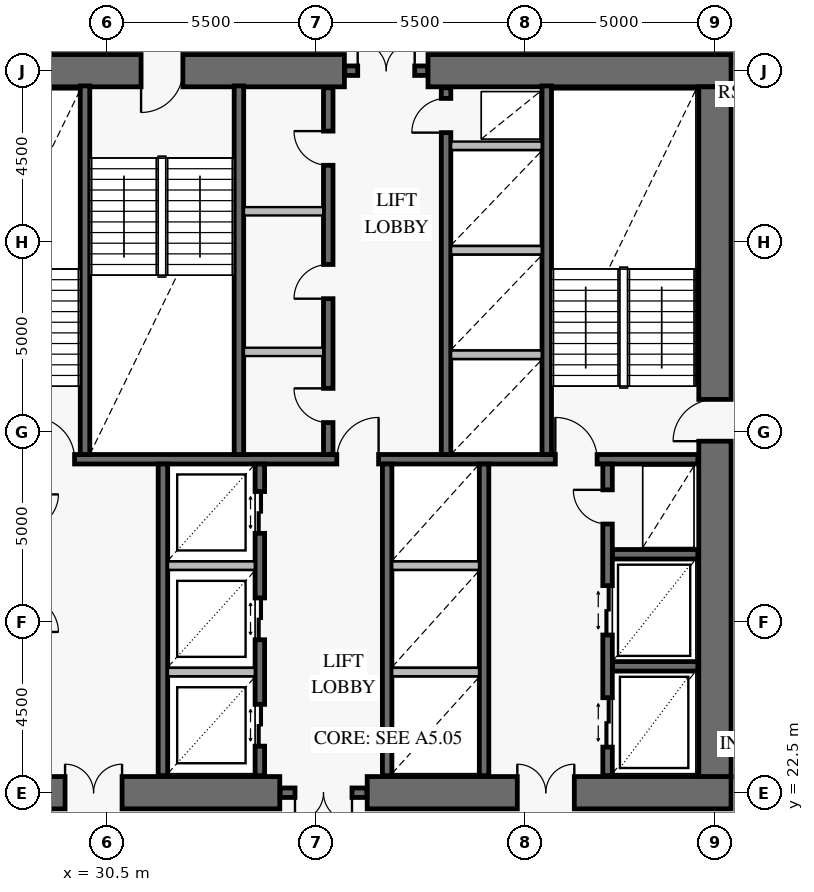
"""IFC4 building model, lengths in metres.
Left out: names, types, materials, properties, quantities, classifications, styles, units other than length and angle.
Written with IfcOpenShell. Run it as: python <this file> out.ifc"""

import sys

from ifc_helpers import new_model, si_unit, direction, frame, frame_2d, origin, place, context, subcontext, project, spatial, rectangle, extrude, element, fill, save


model = new_model("IFC4")
c1 = context("Model", 3, precision=1e-05, world=origin(), true_north=direction((0.0, 1.0)))
c2 = subcontext(c1, "Body", "Model", "MODEL_VIEW")
j1 = project(units=[si_unit("LENGTHUNIT", "METRE"), si_unit("PLANEANGLEUNIT", "RADIAN")], contexts=[c1])
p1 = place(None, origin())
s1 = spatial("IfcSite", under=j1, at=p1, CompositionType="ELEMENT")
p2 = place(p1, origin())
s2 = spatial("IfcBuilding", under=s1, at=p2, CompositionType="ELEMENT")
p3 = place(p2, frame((0.0, 0.0, 20.4)))
s3 = spatial("IfcBuildingStorey", under=s2, at=p3, CompositionType="ELEMENT", Elevation=20.4)
p4 = place(p3, frame((25.075, 22.5, 0.0), z_axis=(0.0, 0.0, 1.0), x_axis=(1.0, 0.0, 0.0)))
e1 = element("IfcWall", 1, at=p4, inside=s3, PredefinedType="SHEAR", context=c2, shape_type="SweptSolid", body=[
    extrude(rectangle(XDim=9.975, YDim=0.85, at=frame_2d((4.988, 0.0))), origin(), (0.0, 0.0, 1.0), 4.2),
])
p5 = place(p4, frame((4.325, 0.0, 0.0)))
e2 = element("IfcOpeningElement", 2, at=p5, cuts=e1, PredefinedType="OPENING", context=c2, shape_type="SweptSolid", body=[
    extrude(rectangle(XDim=1.5, YDim=2.15, at=frame_2d((0.75, 1.075))), frame((0.0, 0.437, 0.0), z_axis=(0.0, -1.0, 0.0), x_axis=(1.0, 0.0, 0.0)), (0.0, 0.0, 1.0), 0.874),
])
p6 = place(p3, frame((37.35, 22.5, 0.0), z_axis=(0.0, 0.0, 1.0), x_axis=(1.0, 0.0, 0.0)))
e3 = element("IfcWall", 3, at=p6, inside=s3, PredefinedType="SHEAR", context=c2, shape_type="SweptSolid", body=[
    extrude(rectangle(XDim=9.575, YDim=0.85, at=frame_2d((4.788, 0.0))), origin(), (0.0, 0.0, 1.0), 4.2),
])
p7 = place(p6, frame((3.95, 0.0, 0.0)))
e4 = element("IfcOpeningElement", 4, at=p7, cuts=e3, PredefinedType="OPENING", context=c2, shape_type="SweptSolid", body=[
    extrude(rectangle(XDim=1.5, YDim=2.15, at=frame_2d((0.75, 1.075))), frame((0.0, 0.437, 0.0), z_axis=(0.0, -1.0, 0.0), x_axis=(1.0, 0.0, 0.0)), (0.0, 0.0, 1.0), 0.874),
])
p8 = place(p3, frame((46.925, 41.5, 0.0), z_axis=(0.0, 0.0, 1.0), x_axis=(-1.0, 0.0, 0.0)))
e5 = element("IfcWall", 5, at=p8, inside=s3, PredefinedType="SHEAR", context=c2, shape_type="SweptSolid", body=[
    extrude(rectangle(XDim=7.975, YDim=0.85, at=frame_2d((3.988, 0.0))), origin(), (0.0, 0.0, 1.0), 4.2),
])
p9 = place(p3, frame((36.75, 41.5, 0.0), z_axis=(0.0, 0.0, 1.0), x_axis=(-1.0, 0.0, 0.0)))
e6 = element("IfcWall", 6, at=p9, inside=s3, PredefinedType="SHEAR", context=c2, shape_type="SweptSolid", body=[
    extrude(rectangle(XDim=11.675, YDim=0.85, at=frame_2d((5.837, 0.0))), origin(), (0.0, 0.0, 1.0), 4.2),
])
p10 = place(p9, frame((4.25, 0.0, 0.0)))
e7 = element("IfcOpeningElement", 7, at=p10, cuts=e6, PredefinedType="OPENING", context=c2, shape_type="SweptSolid", body=[
    extrude(rectangle(XDim=1.1, YDim=2.15, at=frame_2d((0.55, 1.075))), frame((0.0, 0.437, 0.0), z_axis=(0.0, -1.0, 0.0), x_axis=(1.0, 0.0, 0.0)), (0.0, 0.0, 1.0), 0.874),
])
p11 = place(p3, frame((46.5, 22.925, 0.0), z_axis=(0.0, 0.0, 1.0), x_axis=(0.0, 1.0, 0.0)))
e8 = element("IfcWall", 8, at=p11, inside=s3, PredefinedType="SHEAR", context=c2, shape_type="SweptSolid", body=[
    extrude(rectangle(XDim=18.15, YDim=0.85, at=frame_2d((9.075, 0.0))), origin(), (0.0, 0.0, 1.0), 4.2),
])
p12 = place(p11, frame((8.825, 0.0, 0.0)))
e9 = element("IfcOpeningElement", 9, at=p12, cuts=e8, PredefinedType="OPENING", context=c2, shape_type="SweptSolid", body=[
    extrude(rectangle(XDim=1.1, YDim=2.15, at=frame_2d((0.55, 1.075))), frame((0.0, 0.437, 0.0), z_axis=(0.0, -1.0, 0.0), x_axis=(1.0, 0.0, 0.0)), (0.0, 0.0, 1.0), 0.874),
])
p13 = place(p3, frame((35.06, 22.5, 0.0), z_axis=(0.0, 0.0, 1.0), x_axis=(1.0, 0.0, 0.0)))
e10 = element("IfcWall", 10, at=p13, inside=s3, PredefinedType="SOLIDWALL", context=c2, shape_type="SweptSolid", body=[
    extrude(rectangle(XDim=2.28, YDim=0.25, at=frame_2d((1.14, 0.0))), origin(), (0.0, 0.0, 1.0), 4.2),
])
p14 = place(p13, frame((0.39, 0.0, 0.0)))
e11 = element("IfcOpeningElement", 11, at=p14, cuts=e10, PredefinedType="OPENING", context=c2, shape_type="SweptSolid", body=[
    extrude(rectangle(XDim=1.5, YDim=2.15, at=frame_2d((0.75, 1.075))), frame((0.0, 0.137, 0.0), z_axis=(0.0, -1.0, 0.0), x_axis=(1.0, 0.0, 0.0)), (0.0, 0.0, 1.0), 0.274),
])
p15 = place(p3, frame((36.76, 41.5, 0.0), z_axis=(0.0, 0.0, 1.0), x_axis=(1.0, 0.0, 0.0)))
e12 = element("IfcWall", 12, at=p15, inside=s3, PredefinedType="SOLIDWALL", context=c2, shape_type="SweptSolid", body=[
    extrude(rectangle(XDim=2.18, YDim=0.25, at=frame_2d((1.09, 0.0))), origin(), (0.0, 0.0, 1.0), 4.2),
])
p16 = place(p15, frame((0.34, 0.0, 0.0)))
e13 = element("IfcOpeningElement", 13, at=p16, cuts=e12, PredefinedType="OPENING", context=c2, shape_type="SweptSolid", body=[
    extrude(rectangle(XDim=1.5, YDim=2.15, at=frame_2d((0.75, 1.075))), frame((0.0, 0.137, 0.0), z_axis=(0.0, -1.0, 0.0), x_axis=(1.0, 0.0, 0.0)), (0.0, 0.0, 1.0), 0.274),
])
p17 = place(p3, frame((25.95, 31.275, 0.0), z_axis=(0.0, 0.0, 1.0), x_axis=(1.0, 0.0, 0.0)))
e14 = element("IfcWall", 14, at=p17, inside=s3, PredefinedType="SOLIDWALL", context=c2, shape_type="SweptSolid", body=[
    extrude(rectangle(XDim=20.1, YDim=0.25, at=frame_2d((10.05, 0.0))), origin(), (0.0, 0.0, 1.0), 4.2),
])
p18 = place(p17, frame((2.6, 0.0, 0.0)))
e15 = element("IfcOpeningElement", 15, at=p18, cuts=e14, PredefinedType="OPENING", context=c2, shape_type="SweptSolid", body=[
    extrude(rectangle(XDim=1.1, YDim=2.15, at=frame_2d((0.55, 1.075))), frame((0.0, 0.137, 0.0), z_axis=(0.0, -1.0, 0.0), x_axis=(1.0, 0.0, 0.0)), (0.0, 0.0, 1.0), 0.274),
])
p19 = place(p17, frame((10.6, 0.0, 0.0)))
e16 = element("IfcOpeningElement", 16, at=p19, cuts=e14, PredefinedType="OPENING", context=c2, shape_type="SweptSolid", body=[
    extrude(rectangle(XDim=1.1, YDim=2.15, at=frame_2d((0.55, 1.075))), frame((0.0, 0.137, 0.0), z_axis=(0.0, -1.0, 0.0), x_axis=(1.0, 0.0, 0.0)), (0.0, 0.0, 1.0), 0.274),
])
p20 = place(p17, frame((16.35, 0.0, 0.0)))
e17 = element("IfcOpeningElement", 17, at=p20, cuts=e14, PredefinedType="OPENING", context=c2, shape_type="SweptSolid", body=[
    extrude(rectangle(XDim=1.1, YDim=2.15, at=frame_2d((0.55, 1.075))), frame((0.0, 0.137, 0.0), z_axis=(0.0, -1.0, 0.0), x_axis=(1.0, 0.0, 0.0)), (0.0, 0.0, 1.0), 0.274),
])
for number, where, z_axis, x_axis in (
    (18, (29.925, 31.4, 0.0), (0.0, 0.0, 1.0), (0.0, 1.0, 0.0)),
    (19, (33.975, 31.4, 0.0), (0.0, 0.0, 1.0), (0.0, 1.0, 0.0)),
    (20, (42.075, 31.4, 0.0), (0.0, 0.0, 1.0), (0.0, 1.0, 0.0)),
):
    element("IfcWall", number, at=place(p3, frame(where, z_axis=z_axis, x_axis=x_axis)), inside=s3, PredefinedType="SOLIDWALL", context=c2, shape_type="SweptSolid", body=[
        extrude(rectangle(XDim=9.7, YDim=0.25, at=frame_2d((4.85, 0.0))), origin(), (0.0, 0.0, 1.0), 4.2),
    ])
p21 = place(p3, frame((36.325, 31.4, 0.0), z_axis=(0.0, 0.0, 1.0), x_axis=(0.0, 1.0, 0.0)))
e21 = element("IfcWall", 21, at=p21, inside=s3, PredefinedType="SOLIDWALL", context=c2, shape_type="SweptSolid", body=[
    extrude(rectangle(XDim=9.65, YDim=0.25, at=frame_2d((4.825, 0.0))), origin(), (0.0, 0.0, 1.0), 4.2),
])
p22 = place(p21, frame((0.84, 0.0, 0.0)))
e22 = element("IfcOpeningElement", 22, at=p22, cuts=e21, PredefinedType="OPENING", context=c2, shape_type="SweptSolid", body=[
    extrude(rectangle(XDim=0.9, YDim=2.1, at=frame_2d((0.45, 1.05))), frame((0.0, 0.137, 0.0), z_axis=(0.0, -1.0, 0.0), x_axis=(1.0, 0.0, 0.0)), (0.0, 0.0, 1.0), 0.274),
])
p23 = place(p21, frame((4.1, 0.0, 0.0)))
e23 = element("IfcOpeningElement", 23, at=p23, cuts=e21, PredefinedType="OPENING", context=c2, shape_type="SweptSolid", body=[
    extrude(rectangle(XDim=0.9, YDim=2.1, at=frame_2d((0.45, 1.05))), frame((0.0, 0.137, 0.0), z_axis=(0.0, -1.0, 0.0), x_axis=(1.0, 0.0, 0.0)), (0.0, 0.0, 1.0), 0.274),
])
p24 = place(p21, frame((7.61, 0.0, 0.0)))
e24 = element("IfcOpeningElement", 24, at=p24, cuts=e21, PredefinedType="OPENING", context=c2, shape_type="SweptSolid", body=[
    extrude(rectangle(XDim=0.9, YDim=2.1, at=frame_2d((0.45, 1.05))), frame((0.0, 0.137, 0.0), z_axis=(0.0, -1.0, 0.0), x_axis=(1.0, 0.0, 0.0)), (0.0, 0.0, 1.0), 0.274),
])
p25 = place(p3, frame((39.425, 31.4, 0.0), z_axis=(0.0, 0.0, 1.0), x_axis=(0.0, 1.0, 0.0)))
e25 = element("IfcWall", 25, at=p25, inside=s3, PredefinedType="SOLIDWALL", context=c2, shape_type="SweptSolid", body=[
    extrude(rectangle(XDim=9.65, YDim=0.25, at=frame_2d((4.825, 0.0))), origin(), (0.0, 0.0, 1.0), 4.2),
])
p26 = place(p25, frame((8.47, 0.0, 0.0)))
e26 = element("IfcOpeningElement", 26, at=p26, cuts=e25, PredefinedType="OPENING", context=c2, shape_type="SweptSolid", body=[
    extrude(rectangle(XDim=0.9, YDim=2.1, at=frame_2d((0.45, 1.05))), frame((0.0, 0.137, 0.0), z_axis=(0.0, -1.0, 0.0), x_axis=(1.0, 0.0, 0.0)), (0.0, 0.0, 1.0), 0.274),
])
p27 = place(p3, frame((31.975, 22.95, 0.0), z_axis=(0.0, 0.0, 1.0), x_axis=(0.0, 1.0, 0.0)))
e27 = element("IfcWall", 27, at=p27, inside=s3, PredefinedType="SOLIDWALL", context=c2, shape_type="SweptSolid", body=[
    extrude(rectangle(XDim=8.2, YDim=0.25, at=frame_2d((4.1, 0.0))), origin(), (0.0, 0.0, 1.0), 4.2),
])
p28 = place(p3, frame((34.525, 22.95, 0.0), z_axis=(0.0, 0.0, 1.0), x_axis=(0.0, 1.0, 0.0)))
e28 = element("IfcWall", 28, at=p28, inside=s3, PredefinedType="SOLIDWALL", context=c2, shape_type="SweptSolid", body=[
    extrude(rectangle(XDim=8.2, YDim=0.25, at=frame_2d((4.1, 0.0))), origin(), (0.0, 0.0, 1.0), 4.2),
])
p29 = place(p28, frame((0.775, 0.0, 0.0)))
e29 = element("IfcOpeningElement", 29, at=p29, cuts=e28, PredefinedType="OPENING", context=c2, shape_type="SweptSolid", body=[
    extrude(rectangle(XDim=1.1, YDim=2.2, at=frame_2d((0.55, 1.1))), frame((0.0, 0.137, 0.0), z_axis=(0.0, -1.0, 0.0), x_axis=(1.0, 0.0, 0.0)), (0.0, 0.0, 1.0), 0.274),
])
p30 = place(p28, frame((3.575, 0.0, 0.0)))
e30 = element("IfcOpeningElement", 30, at=p30, cuts=e28, PredefinedType="OPENING", context=c2, shape_type="SweptSolid", body=[
    extrude(rectangle(XDim=1.1, YDim=2.2, at=frame_2d((0.55, 1.1))), frame((0.0, 0.137, 0.0), z_axis=(0.0, -1.0, 0.0), x_axis=(1.0, 0.0, 0.0)), (0.0, 0.0, 1.0), 0.274),
])
p31 = place(p28, frame((6.375, 0.0, 0.0)))
e31 = element("IfcOpeningElement", 31, at=p31, cuts=e28, PredefinedType="OPENING", context=c2, shape_type="SweptSolid", body=[
    extrude(rectangle(XDim=1.1, YDim=2.2, at=frame_2d((0.55, 1.1))), frame((0.0, 0.137, 0.0), z_axis=(0.0, -1.0, 0.0), x_axis=(1.0, 0.0, 0.0)), (0.0, 0.0, 1.0), 0.274),
])
for number, where, z_axis, x_axis in (
    (32, (37.875, 22.95, 0.0), (0.0, 0.0, 1.0), (0.0, 1.0, 0.0)),
    (33, (40.425, 22.95, 0.0), (0.0, 0.0, 1.0), (0.0, 1.0, 0.0)),
):
    element("IfcWall", number, at=place(p3, frame(where, z_axis=z_axis, x_axis=x_axis)), inside=s3, PredefinedType="SOLIDWALL", context=c2, shape_type="SweptSolid", body=[
        extrude(rectangle(XDim=8.2, YDim=0.25, at=frame_2d((4.1, 0.0))), origin(), (0.0, 0.0, 1.0), 4.2),
    ])
for number, where, z_axis, x_axis in (
    (34, (43.8, 25.825, 0.0), (0.0, 0.0, 1.0), (1.0, 0.0, 0.0)),
    (35, (43.8, 28.775, 0.0), (0.0, 0.0, 1.0), (1.0, 0.0, 0.0)),
):
    element("IfcWall", number, at=place(p3, frame(where, z_axis=z_axis, x_axis=x_axis)), inside=s3, PredefinedType="SOLIDWALL", context=c2, shape_type="SweptSolid", body=[
        extrude(rectangle(XDim=2.25, YDim=0.25, at=frame_2d((1.125, 0.0))), origin(), (0.0, 0.0, 1.0), 4.2),
    ])
p32 = place(p3, frame((43.675, 22.95, 0.0), z_axis=(0.0, 0.0, 1.0), x_axis=(0.0, 1.0, 0.0)))
e36 = element("IfcWall", 36, at=p32, inside=s3, PredefinedType="SOLIDWALL", context=c2, shape_type="SweptSolid", body=[
    extrude(rectangle(XDim=8.2, YDim=0.25, at=frame_2d((4.1, 0.0))), origin(), (0.0, 0.0, 1.0), 4.2),
])
p33 = place(p32, frame((0.75, 0.0, 0.0)))
e37 = element("IfcOpeningElement", 37, at=p33, cuts=e36, PredefinedType="OPENING", context=c2, shape_type="SweptSolid", body=[
    extrude(rectangle(XDim=1.3, YDim=2.3, at=frame_2d((0.65, 1.15))), frame((0.0, 0.137, 0.0), z_axis=(0.0, -1.0, 0.0), x_axis=(1.0, 0.0, 0.0)), (0.0, 0.0, 1.0), 0.274),
])
p34 = place(p32, frame((3.7, 0.0, 0.0)))
e38 = element("IfcOpeningElement", 38, at=p34, cuts=e36, PredefinedType="OPENING", context=c2, shape_type="SweptSolid", body=[
    extrude(rectangle(XDim=1.3, YDim=2.3, at=frame_2d((0.65, 1.15))), frame((0.0, 0.137, 0.0), z_axis=(0.0, -1.0, 0.0), x_axis=(1.0, 0.0, 0.0)), (0.0, 0.0, 1.0), 0.274),
])
p35 = place(p32, frame((6.62, 0.0, 0.0)))
e39 = element("IfcOpeningElement", 39, at=p35, cuts=e36, PredefinedType="OPENING", context=c2, shape_type="SweptSolid", body=[
    extrude(rectangle(XDim=0.9, YDim=2.1, at=frame_2d((0.45, 1.05))), frame((0.0, 0.137, 0.0), z_axis=(0.0, -1.0, 0.0), x_axis=(1.0, 0.0, 0.0)), (0.0, 0.0, 1.0), 0.274),
])
for number, where, z_axis, x_axis in (
    (40, (34.108, 34.1, 0.0), (0.0, 0.0, 1.0), (1.0, 0.0, 0.0)),
    (41, (34.108, 37.8, 0.0), (0.0, 0.0, 1.0), (1.0, 0.0, 0.0)),
):
    element("IfcWall", number, at=place(p3, frame(where, z_axis=z_axis, x_axis=x_axis)), inside=s3, PredefinedType="PARTITIONING", context=c2, shape_type="SweptSolid", body=[
        extrude(rectangle(XDim=2.084, YDim=0.22, at=frame_2d((1.042, 0.0))), origin(), (0.0, 0.0, 1.0), 3.92),
    ])
for number, where, z_axis, x_axis in (
    (42, (39.558, 34.025, 0.0), (0.0, 0.0, 1.0), (1.0, 0.0, 0.0)),
    (43, (39.558, 36.775, 0.0), (0.0, 0.0, 1.0), (1.0, 0.0, 0.0)),
    (44, (39.558, 39.525, 0.0), (0.0, 0.0, 1.0), (1.0, 0.0, 0.0)),
):
    element("IfcWall", number, at=place(p3, frame(where, z_axis=z_axis, x_axis=x_axis)), inside=s3, PredefinedType="PARTITIONING", context=c2, shape_type="SweptSolid", body=[
        extrude(rectangle(XDim=2.384, YDim=0.22, at=frame_2d((1.192, 0.0))), origin(), (0.0, 0.0, 1.0), 3.92),
    ])
for number, where, z_axis, x_axis in (
    (45, (32.108, 25.675, 0.0), (0.0, 0.0, 1.0), (1.0, 0.0, 0.0)),
    (46, (32.108, 28.475, 0.0), (0.0, 0.0, 1.0), (1.0, 0.0, 0.0)),
):
    element("IfcWall", number, at=place(p3, frame(where, z_axis=z_axis, x_axis=x_axis)), inside=s3, PredefinedType="PARTITIONING", context=c2, shape_type="SweptSolid", body=[
        extrude(rectangle(XDim=2.284, YDim=0.22, at=frame_2d((1.142, 0.0))), origin(), (0.0, 0.0, 1.0), 3.92),
    ])
for number, where, z_axis, x_axis in (
    (47, (38.008, 25.675, 0.0), (0.0, 0.0, 1.0), (1.0, 0.0, 0.0)),
    (48, (38.008, 28.475, 0.0), (0.0, 0.0, 1.0), (1.0, 0.0, 0.0)),
):
    element("IfcWall", number, at=place(p3, frame(where, z_axis=z_axis, x_axis=x_axis)), inside=s3, PredefinedType="PARTITIONING", context=c2, shape_type="SweptSolid", body=[
        extrude(rectangle(XDim=2.284, YDim=0.22, at=frame_2d((1.142, 0.0))), origin(), (0.0, 0.0, 1.0), 3.92),
    ])
p36 = place(p12, origin())
e49 = element("IfcDoor", 49, at=p36, inside=s3, OperationType="SINGLE_SWING_LEFT", PredefinedType="USERDEFINED", context=c2, shape_type="SweptSolid", body=[
    extrude(rectangle(XDim=1.1, YDim=2.15, at=frame_2d((0.55, 1.075))), frame((0.0, 0.025, 0.0), z_axis=(0.0, -1.0, 0.0), x_axis=(1.0, 0.0, 0.0)), (0.0, 0.0, 1.0), 0.05),
])
fill(e9, e49)
p37 = place(p10, origin())
e50 = element("IfcDoor", 50, at=p37, inside=s3, OperationType="SINGLE_SWING_RIGHT", PredefinedType="USERDEFINED", context=c2, shape_type="SweptSolid", body=[
    extrude(rectangle(XDim=1.1, YDim=2.15, at=frame_2d((0.55, 1.075))), frame((0.0, 0.025, 0.0), z_axis=(0.0, -1.0, 0.0), x_axis=(1.0, 0.0, 0.0)), (0.0, 0.0, 1.0), 0.05),
])
fill(e7, e50)
p38 = place(p5, origin())
e51 = element("IfcDoor", 51, at=p38, inside=s3, OperationType="DOUBLE_DOOR_SINGLE_SWING", PredefinedType="DOOR", context=c2, shape_type="SweptSolid", body=[
    extrude(rectangle(XDim=1.5, YDim=2.15, at=frame_2d((0.75, 1.075))), frame((0.0, 0.025, 0.0), z_axis=(0.0, -1.0, 0.0), x_axis=(1.0, 0.0, 0.0)), (0.0, 0.0, 1.0), 0.05),
])
fill(e2, e51)
p39 = place(p7, origin())
e52 = element("IfcDoor", 52, at=p39, inside=s3, OperationType="DOUBLE_DOOR_SINGLE_SWING", PredefinedType="DOOR", context=c2, shape_type="SweptSolid", body=[
    extrude(rectangle(XDim=1.5, YDim=2.15, at=frame_2d((0.75, 1.075))), frame((0.0, 0.025, 0.0), z_axis=(0.0, -1.0, 0.0), x_axis=(1.0, 0.0, 0.0)), (0.0, 0.0, 1.0), 0.05),
])
fill(e4, e52)
p40 = place(p14, frame((1.5, 0.0, 0.0), z_axis=(0.0, 0.0, 1.0), x_axis=(-1.0, 0.0, 0.0)))
e53 = element("IfcDoor", 53, at=p40, inside=s3, OperationType="DOUBLE_DOOR_SINGLE_SWING", PredefinedType="DOOR", context=c2, shape_type="SweptSolid", body=[
    extrude(rectangle(XDim=1.5, YDim=2.15, at=frame_2d((0.75, 1.075))), frame((0.0, 0.025, 0.0), z_axis=(0.0, -1.0, 0.0), x_axis=(1.0, 0.0, 0.0)), (0.0, 0.0, 1.0), 0.05),
])
fill(e11, e53)
p41 = place(p16, origin())
e54 = element("IfcDoor", 54, at=p41, inside=s3, OperationType="DOUBLE_DOOR_SINGLE_SWING", PredefinedType="DOOR", context=c2, shape_type="SweptSolid", body=[
    extrude(rectangle(XDim=1.5, YDim=2.15, at=frame_2d((0.75, 1.075))), frame((0.0, 0.025, 0.0), z_axis=(0.0, -1.0, 0.0), x_axis=(1.0, 0.0, 0.0)), (0.0, 0.0, 1.0), 0.05),
])
fill(e13, e54)
p42 = place(p18, origin())
e55 = element("IfcDoor", 55, at=p42, inside=s3, OperationType="SINGLE_SWING_LEFT", PredefinedType="USERDEFINED", context=c2, shape_type="SweptSolid", body=[
    extrude(rectangle(XDim=1.1, YDim=2.15, at=frame_2d((0.55, 1.075))), frame((0.0, 0.025, 0.0), z_axis=(0.0, -1.0, 0.0), x_axis=(1.0, 0.0, 0.0)), (0.0, 0.0, 1.0), 0.05),
])
fill(e15, e55)
p43 = place(p19, origin())
e56 = element("IfcDoor", 56, at=p43, inside=s3, OperationType="SINGLE_SWING_RIGHT", PredefinedType="USERDEFINED", context=c2, shape_type="SweptSolid", body=[
    extrude(rectangle(XDim=1.1, YDim=2.15, at=frame_2d((0.55, 1.075))), frame((0.0, 0.025, 0.0), z_axis=(0.0, -1.0, 0.0), x_axis=(1.0, 0.0, 0.0)), (0.0, 0.0, 1.0), 0.05),
])
fill(e16, e56)
p44 = place(p20, origin())
e57 = element("IfcDoor", 57, at=p44, inside=s3, OperationType="SINGLE_SWING_LEFT", PredefinedType="USERDEFINED", context=c2, shape_type="SweptSolid", body=[
    extrude(rectangle(XDim=1.1, YDim=2.15, at=frame_2d((0.55, 1.075))), frame((0.0, 0.025, 0.0), z_axis=(0.0, -1.0, 0.0), x_axis=(1.0, 0.0, 0.0)), (0.0, 0.0, 1.0), 0.05),
])
fill(e17, e57)
p45 = place(p22, origin())
e58 = element("IfcDoor", 58, at=p45, inside=s3, OperationType="SINGLE_SWING_RIGHT", PredefinedType="DOOR", context=c2, shape_type="SweptSolid", body=[
    extrude(rectangle(XDim=0.9, YDim=2.1, at=frame_2d((0.45, 1.05))), frame((0.0, 0.025, 0.0), z_axis=(0.0, -1.0, 0.0), x_axis=(1.0, 0.0, 0.0)), (0.0, 0.0, 1.0), 0.05),
])
fill(e22, e58)
p46 = place(p23, origin())
e59 = element("IfcDoor", 59, at=p46, inside=s3, OperationType="SINGLE_SWING_LEFT", PredefinedType="DOOR", context=c2, shape_type="SweptSolid", body=[
    extrude(rectangle(XDim=0.9, YDim=2.1, at=frame_2d((0.45, 1.05))), frame((0.0, 0.025, 0.0), z_axis=(0.0, -1.0, 0.0), x_axis=(1.0, 0.0, 0.0)), (0.0, 0.0, 1.0), 0.05),
])
fill(e23, e59)
p47 = place(p24, origin())
e60 = element("IfcDoor", 60, at=p47, inside=s3, OperationType="SINGLE_SWING_RIGHT", PredefinedType="DOOR", context=c2, shape_type="SweptSolid", body=[
    extrude(rectangle(XDim=0.9, YDim=2.1, at=frame_2d((0.45, 1.05))), frame((0.0, 0.025, 0.0), z_axis=(0.0, -1.0, 0.0), x_axis=(1.0, 0.0, 0.0)), (0.0, 0.0, 1.0), 0.05),
])
fill(e24, e60)
p48 = place(p26, origin())
e61 = element("IfcDoor", 61, at=p48, inside=s3, OperationType="SINGLE_SWING_LEFT", PredefinedType="DOOR", context=c2, shape_type="SweptSolid", body=[
    extrude(rectangle(XDim=0.9, YDim=2.1, at=frame_2d((0.45, 1.05))), frame((0.0, 0.025, 0.0), z_axis=(0.0, -1.0, 0.0), x_axis=(1.0, 0.0, 0.0)), (0.0, 0.0, 1.0), 0.05),
])
fill(e26, e61)
p49 = place(p29, frame((1.1, 0.0, 0.0), z_axis=(0.0, 0.0, 1.0), x_axis=(-1.0, 0.0, 0.0)))
e62 = element("IfcDoor", 62, at=p49, inside=s3, OperationType="DOUBLE_DOOR_SLIDING", PredefinedType="DOOR", context=c2, shape_type="SweptSolid", body=[
    extrude(rectangle(XDim=1.1, YDim=2.2, at=frame_2d((0.55, 1.1))), frame((0.0, 0.025, 0.0), z_axis=(0.0, -1.0, 0.0), x_axis=(1.0, 0.0, 0.0)), (0.0, 0.0, 1.0), 0.05),
])
fill(e29, e62)
p50 = place(p30, frame((1.1, 0.0, 0.0), z_axis=(0.0, 0.0, 1.0), x_axis=(-1.0, 0.0, 0.0)))
e63 = element("IfcDoor", 63, at=p50, inside=s3, OperationType="DOUBLE_DOOR_SLIDING", PredefinedType="DOOR", context=c2, shape_type="SweptSolid", body=[
    extrude(rectangle(XDim=1.1, YDim=2.2, at=frame_2d((0.55, 1.1))), frame((0.0, 0.025, 0.0), z_axis=(0.0, -1.0, 0.0), x_axis=(1.0, 0.0, 0.0)), (0.0, 0.0, 1.0), 0.05),
])
fill(e30, e63)
p51 = place(p31, frame((1.1, 0.0, 0.0), z_axis=(0.0, 0.0, 1.0), x_axis=(-1.0, 0.0, 0.0)))
e64 = element("IfcDoor", 64, at=p51, inside=s3, OperationType="DOUBLE_DOOR_SLIDING", PredefinedType="DOOR", context=c2, shape_type="SweptSolid", body=[
    extrude(rectangle(XDim=1.1, YDim=2.2, at=frame_2d((0.55, 1.1))), frame((0.0, 0.025, 0.0), z_axis=(0.0, -1.0, 0.0), x_axis=(1.0, 0.0, 0.0)), (0.0, 0.0, 1.0), 0.05),
])
fill(e31, e64)
p52 = place(p33, origin())
e65 = element("IfcDoor", 65, at=p52, inside=s3, OperationType="DOUBLE_DOOR_SLIDING", PredefinedType="DOOR", context=c2, shape_type="SweptSolid", body=[
    extrude(rectangle(XDim=1.3, YDim=2.3, at=frame_2d((0.65, 1.15))), frame((0.0, 0.025, 0.0), z_axis=(0.0, -1.0, 0.0), x_axis=(1.0, 0.0, 0.0)), (0.0, 0.0, 1.0), 0.05),
])
fill(e37, e65)
p53 = place(p34, origin())
e66 = element("IfcDoor", 66, at=p53, inside=s3, OperationType="DOUBLE_DOOR_SLIDING", PredefinedType="DOOR", context=c2, shape_type="SweptSolid", body=[
    extrude(rectangle(XDim=1.3, YDim=2.3, at=frame_2d((0.65, 1.15))), frame((0.0, 0.025, 0.0), z_axis=(0.0, -1.0, 0.0), x_axis=(1.0, 0.0, 0.0)), (0.0, 0.0, 1.0), 0.05),
])
fill(e38, e66)
p54 = place(p35, origin())
e67 = element("IfcDoor", 67, at=p54, inside=s3, OperationType="SINGLE_SWING_RIGHT", PredefinedType="DOOR", context=c2, shape_type="SweptSolid", body=[
    extrude(rectangle(XDim=0.9, YDim=2.1, at=frame_2d((0.45, 1.05))), frame((0.0, 0.025, 0.0), z_axis=(0.0, -1.0, 0.0), x_axis=(1.0, 0.0, 0.0)), (0.0, 0.0, 1.0), 0.05),
])
fill(e39, e67)
save(model, sys.argv[1])
